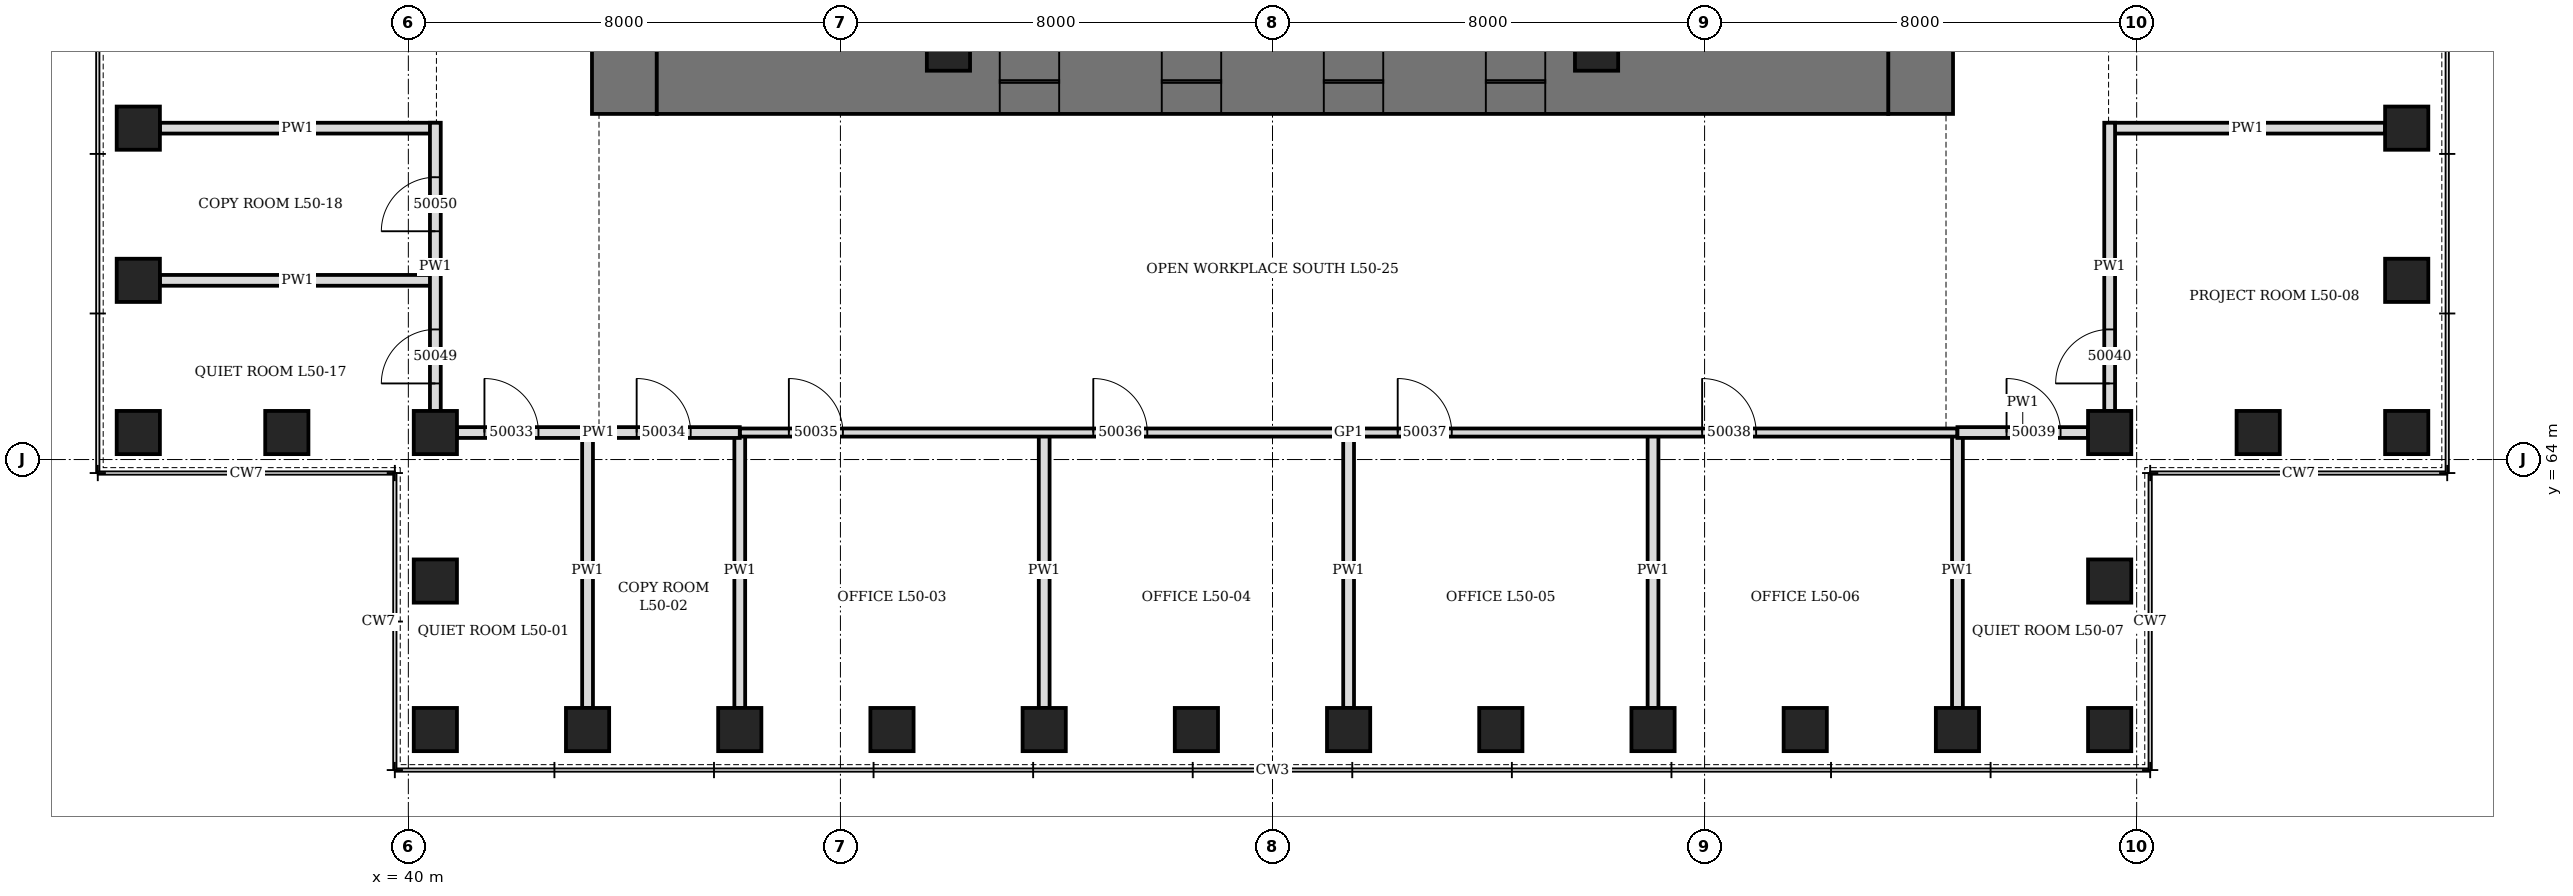
"""IFC4 building model, lengths in metres.
Left out: names, types, materials, properties, quantities, classifications, styles, units other than length and angle.
Written with IfcOpenShell. Run it as: python <this file> out.ifc"""

import sys

from ifc_helpers import new_model, si_unit, direction, frame, frame_2d, origin, origin_2d, place, context, subcontext, project, spatial, rectangle, hollow_rectangle, extrude, element, fill, save


model = new_model("IFC4")
c1 = context("Model", 3, precision=1e-05, world=origin(), true_north=direction((0.0, 1.0)))
c2 = subcontext(c1, "Body", "Model", "MODEL_VIEW")
j1 = project(units=[si_unit("LENGTHUNIT", "METRE"), si_unit("PLANEANGLEUNIT", "RADIAN")], contexts=[c1])
p1 = place(None, origin())
s1 = spatial("IfcSite", under=j1, at=p1, CompositionType="ELEMENT")
p2 = place(p1, origin())
s2 = spatial("IfcBuilding", under=s1, at=p2, CompositionType="ELEMENT")
p3 = place(p2, frame((0.0, 0.0, 223.3)))
s3 = spatial("IfcBuildingStorey", under=s2, at=p3, CompositionType="ELEMENT", Elevation=223.3)
for number, where, z_axis, x_axis in (
    (1, (40.5, 59.0, 0.0), (0.0, 0.0, 1.0), (1.0, 0.0, 0.0)),
    (2, (43.318, 59.0, 0.0), (0.0, 0.0, 1.0), (1.0, 0.0, 0.0)),
    (3, (46.136, 59.0, 0.0), (0.0, 0.0, 1.0), (1.0, 0.0, 0.0)),
    (4, (48.955, 59.0, 0.0), (0.0, 0.0, 1.0), (1.0, 0.0, 0.0)),
    (5, (51.773, 59.0, 0.0), (0.0, 0.0, 1.0), (1.0, 0.0, 0.0)),
    (6, (54.591, 59.0, 0.0), (0.0, 0.0, 1.0), (1.0, 0.0, 0.0)),
    (7, (57.409, 59.0, 0.0), (0.0, 0.0, 1.0), (1.0, 0.0, 0.0)),
    (8, (60.227, 59.0, 0.0), (0.0, 0.0, 1.0), (1.0, 0.0, 0.0)),
    (9, (63.045, 59.0, 0.0), (0.0, 0.0, 1.0), (1.0, 0.0, 0.0)),
    (10, (65.864, 59.0, 0.0), (0.0, 0.0, 1.0), (1.0, 0.0, 0.0)),
    (11, (68.682, 59.0, 0.0), (0.0, 0.0, 1.0), (1.0, 0.0, 0.0)),
    (12, (71.5, 59.0, 0.0), (0.0, 0.0, 1.0), (0.0, 1.0, 0.0)),
    (13, (71.5, 61.75, 0.0), (0.0, 0.0, 1.0), (0.0, 1.0, 0.0)),
    (14, (71.5, 64.5, 0.0), (0.0, 0.0, 1.0), (1.0, 0.0, 0.0)),
    (15, (74.25, 64.5, 0.0), (0.0, 0.0, 1.0), (1.0, 0.0, 0.0)),
    (16, (77.0, 64.5, 0.0), (0.0, 0.0, 1.0), (0.0, 1.0, 0.0)),
    (17, (77.0, 67.318, 0.0), (0.0, 0.0, 1.0), (0.0, 1.0, 0.0)),
    (18, (77.0, 70.136, 0.0), (0.0, 0.0, 1.0), (0.0, 1.0, 0.0)),
    (19, (35.0, 70.136, 0.0), (0.0, 0.0, 1.0), (0.0, 1.0, 0.0)),
    (20, (35.0, 67.318, 0.0), (0.0, 0.0, 1.0), (0.0, 1.0, 0.0)),
    (21, (35.0, 64.5, 0.0), (0.0, 0.0, 1.0), (1.0, 0.0, 0.0)),
    (22, (37.75, 64.5, 0.0), (0.0, 0.0, 1.0), (1.0, 0.0, 0.0)),
    (23, (40.5, 64.5, 0.0), (0.0, 0.0, 1.0), (0.0, 1.0, 0.0)),
    (24, (40.5, 61.75, 0.0), (0.0, 0.0, 1.0), (0.0, 1.0, 0.0)),
):
    element("IfcColumn", number, at=place(p3, frame(where, z_axis=z_axis, x_axis=x_axis)), inside=s3, PredefinedType="COLUMN", context=c2, shape_type="SweptSolid", body=[
        extrude(hollow_rectangle(XDim=0.8, YDim=0.8, WallThickness=0.08, at=origin_2d()), origin(), (0.0, 0.0, 1.0), 4.2),
    ])
p4 = place(p3, frame((44.0, 70.4, 0.0), z_axis=(0.0, 0.0, 1.0), x_axis=(0.0, 1.0, 0.0)))
e25 = element("IfcWall", 25, at=p4, inside=s3, PredefinedType="SHEAR", context=c2, shape_type="SweptSolid", body=[
    extrude(rectangle(XDim=19.2, YDim=1.2, at=frame_2d((9.6, 0.0))), origin(), (0.0, 0.0, 1.0), 4.2),
])
p5 = place(p4, frame((8.6, 0.0, 0.0)))
e26 = element("IfcOpeningElement", 26, at=p5, cuts=e25, PredefinedType="OPENING", context=c2, shape_type="SweptSolid", body=[
    extrude(rectangle(XDim=2.0, YDim=2.4, at=frame_2d((1.0, 1.2))), frame((0.0, 0.61, 0.0), z_axis=(0.0, -1.0, 0.0), x_axis=(1.0, 0.0, 0.0)), (0.0, 0.0, 1.0), 1.22),
])
p6 = place(p3, frame((68.0, 70.4, 0.0), z_axis=(0.0, 0.0, 1.0), x_axis=(0.0, 1.0, 0.0)))
e27 = element("IfcWall", 27, at=p6, inside=s3, PredefinedType="SHEAR", context=c2, shape_type="SweptSolid", body=[
    extrude(rectangle(XDim=19.2, YDim=1.2, at=frame_2d((9.6, 0.0))), origin(), (0.0, 0.0, 1.0), 4.2),
])
p7 = place(p6, frame((8.6, 0.0, 0.0)))
e28 = element("IfcOpeningElement", 28, at=p7, cuts=e27, PredefinedType="OPENING", context=c2, shape_type="SweptSolid", body=[
    extrude(rectangle(XDim=2.0, YDim=2.4, at=frame_2d((1.0, 1.2))), frame((0.0, 0.61, 0.0), z_axis=(0.0, -1.0, 0.0), x_axis=(1.0, 0.0, 0.0)), (0.0, 0.0, 1.0), 1.22),
])
p8 = place(p3, frame((44.6, 71.0, 0.0), z_axis=(0.0, 0.0, 1.0), x_axis=(1.0, 0.0, 0.0)))
e29 = element("IfcWall", 29, at=p8, inside=s3, PredefinedType="SHEAR", context=c2, shape_type="SweptSolid", body=[
    extrude(rectangle(XDim=22.8, YDim=1.2, at=frame_2d((11.4, 0.0))), origin(), (0.0, 0.0, 1.0), 4.2),
])
p9 = place(p8, frame((6.35, 0.0, 0.0)))
e30 = element("IfcOpeningElement", 30, at=p9, cuts=e29, PredefinedType="OPENING", context=c2, shape_type="SweptSolid", body=[
    extrude(rectangle(XDim=1.1, YDim=2.2, at=frame_2d((0.55, 1.1))), frame((0.0, 0.61, 0.0), z_axis=(0.0, -1.0, 0.0), x_axis=(1.0, 0.0, 0.0)), (0.0, 0.0, 1.0), 1.22),
])
p10 = place(p8, frame((9.35, 0.0, 0.0)))
e31 = element("IfcOpeningElement", 31, at=p10, cuts=e29, PredefinedType="OPENING", context=c2, shape_type="SweptSolid", body=[
    extrude(rectangle(XDim=1.1, YDim=2.2, at=frame_2d((0.55, 1.1))), frame((0.0, 0.61, 0.0), z_axis=(0.0, -1.0, 0.0), x_axis=(1.0, 0.0, 0.0)), (0.0, 0.0, 1.0), 1.22),
])
p11 = place(p8, frame((12.35, 0.0, 0.0)))
e32 = element("IfcOpeningElement", 32, at=p11, cuts=e29, PredefinedType="OPENING", context=c2, shape_type="SweptSolid", body=[
    extrude(rectangle(XDim=1.1, YDim=2.2, at=frame_2d((0.55, 1.1))), frame((0.0, 0.61, 0.0), z_axis=(0.0, -1.0, 0.0), x_axis=(1.0, 0.0, 0.0)), (0.0, 0.0, 1.0), 1.22),
])
p12 = place(p8, frame((15.35, 0.0, 0.0)))
e33 = element("IfcOpeningElement", 33, at=p12, cuts=e29, PredefinedType="OPENING", context=c2, shape_type="SweptSolid", body=[
    extrude(rectangle(XDim=1.1, YDim=2.2, at=frame_2d((0.55, 1.1))), frame((0.0, 0.61, 0.0), z_axis=(0.0, -1.0, 0.0), x_axis=(1.0, 0.0, 0.0)), (0.0, 0.0, 1.0), 1.22),
])
for number, where, z_axis, x_axis in (
    (34, (50.0, 71.6, 0.0), (0.0, 0.0, 1.0), (1.0, 0.0, 0.0)),
    (35, (62.0, 71.6, 0.0), (0.0, 0.0, 1.0), (1.0, 0.0, 0.0)),
):
    element("IfcColumn", number, at=place(p3, frame(where, z_axis=z_axis, x_axis=x_axis)), inside=s3, PredefinedType="COLUMN", context=c2, shape_type="SweptSolid", body=[
        extrude(hollow_rectangle(XDim=0.8, YDim=0.8, WallThickness=0.1, at=origin_2d()), origin(), (0.0, 0.0, 1.0), 4.2),
    ])
for number, where, z_axis, x_axis in (
    (36, (43.318, 59.4, 0.0), (0.0, 0.0, 1.0), (0.0, 1.0, 0.0)),
    (37, (46.136, 59.4, 0.0), (0.0, 0.0, 1.0), (0.0, 1.0, 0.0)),
    (38, (51.773, 59.4, 0.0), (0.0, 0.0, 1.0), (0.0, 1.0, 0.0)),
    (39, (57.409, 59.4, 0.0), (0.0, 0.0, 1.0), (0.0, 1.0, 0.0)),
    (40, (63.045, 59.4, 0.0), (0.0, 0.0, 1.0), (0.0, 1.0, 0.0)),
    (41, (68.682, 59.4, 0.0), (0.0, 0.0, 1.0), (0.0, 1.0, 0.0)),
    (42, (71.5, 70.136, 0.0), (0.0, 0.0, 1.0), (1.0, 0.0, 0.0)),
    (43, (35.4, 67.318, 0.0), (0.0, 0.0, 1.0), (1.0, 0.0, 0.0)),
    (44, (35.4, 70.136, 0.0), (0.0, 0.0, 1.0), (1.0, 0.0, 0.0)),
):
    element("IfcWall", number, at=place(p3, frame(where, z_axis=z_axis, x_axis=x_axis)), inside=s3, PredefinedType="PARTITIONING", context=c2, shape_type="SweptSolid", body=[
        extrude(rectangle(XDim=5.1, YDim=0.2, at=frame_2d((2.55, 0.0))), origin(), (0.0, 0.0, 1.0), 3.428),
    ])
p13 = place(p3, frame((46.136, 64.5, 0.0), z_axis=(0.0, 0.0, 1.0), x_axis=(1.0, 0.0, 0.0)))
e45 = element("IfcWall", 45, at=p13, inside=s3, PredefinedType="PARTITIONING", context=c2, shape_type="SweptSolid", body=[
    extrude(rectangle(XDim=22.545, YDim=0.15, at=frame_2d((11.273, 0.0))), origin(), (0.0, 0.0, 1.0), 4.04),
])
p14 = place(p13, frame((0.909, 0.0, 0.0)))
e46 = element("IfcOpeningElement", 46, at=p14, cuts=e45, PredefinedType="OPENING", context=c2, shape_type="SweptSolid", body=[
    extrude(rectangle(XDim=1.0, YDim=2.1, at=frame_2d((0.5, 1.05))), frame((0.0, 0.085, 0.0), z_axis=(0.0, -1.0, 0.0), x_axis=(1.0, 0.0, 0.0)), (0.0, 0.0, 1.0), 0.17),
])
p15 = place(p13, frame((6.545, 0.0, 0.0)))
e47 = element("IfcOpeningElement", 47, at=p15, cuts=e45, PredefinedType="OPENING", context=c2, shape_type="SweptSolid", body=[
    extrude(rectangle(XDim=1.0, YDim=2.1, at=frame_2d((0.5, 1.05))), frame((0.0, 0.085, 0.0), z_axis=(0.0, -1.0, 0.0), x_axis=(1.0, 0.0, 0.0)), (0.0, 0.0, 1.0), 0.17),
])
p16 = place(p13, frame((12.182, 0.0, 0.0)))
e48 = element("IfcOpeningElement", 48, at=p16, cuts=e45, PredefinedType="OPENING", context=c2, shape_type="SweptSolid", body=[
    extrude(rectangle(XDim=1.0, YDim=2.1, at=frame_2d((0.5, 1.05))), frame((0.0, 0.085, 0.0), z_axis=(0.0, -1.0, 0.0), x_axis=(1.0, 0.0, 0.0)), (0.0, 0.0, 1.0), 0.17),
])
p17 = place(p13, frame((17.818, 0.0, 0.0)))
e49 = element("IfcOpeningElement", 49, at=p17, cuts=e45, PredefinedType="OPENING", context=c2, shape_type="SweptSolid", body=[
    extrude(rectangle(XDim=1.0, YDim=2.1, at=frame_2d((0.5, 1.05))), frame((0.0, 0.085, 0.0), z_axis=(0.0, -1.0, 0.0), x_axis=(1.0, 0.0, 0.0)), (0.0, 0.0, 1.0), 0.17),
])
p18 = place(p3, frame((40.9, 64.5, 0.0), z_axis=(0.0, 0.0, 1.0), x_axis=(1.0, 0.0, 0.0)))
e50 = element("IfcWall", 50, at=p18, inside=s3, PredefinedType="PARTITIONING", context=c2, shape_type="SweptSolid", body=[
    extrude(rectangle(XDim=5.237, YDim=0.2, at=frame_2d((2.618, 0.0))), origin(), (0.0, 0.0, 1.0), 4.04),
])
p19 = place(p18, frame((0.509, 0.0, 0.0)))
e51 = element("IfcOpeningElement", 51, at=p19, cuts=e50, PredefinedType="OPENING", context=c2, shape_type="SweptSolid", body=[
    extrude(rectangle(XDim=1.0, YDim=2.1, at=frame_2d((0.5, 1.05))), frame((0.0, 0.11, 0.0), z_axis=(0.0, -1.0, 0.0), x_axis=(1.0, 0.0, 0.0)), (0.0, 0.0, 1.0), 0.22),
])
p20 = place(p18, frame((3.327, 0.0, 0.0)))
e52 = element("IfcOpeningElement", 52, at=p20, cuts=e50, PredefinedType="OPENING", context=c2, shape_type="SweptSolid", body=[
    extrude(rectangle(XDim=1.0, YDim=2.1, at=frame_2d((0.5, 1.05))), frame((0.0, 0.11, 0.0), z_axis=(0.0, -1.0, 0.0), x_axis=(1.0, 0.0, 0.0)), (0.0, 0.0, 1.0), 0.22),
])
p21 = place(p3, frame((68.682, 64.5, 0.0), z_axis=(0.0, 0.0, 1.0), x_axis=(1.0, 0.0, 0.0)))
e53 = element("IfcWall", 53, at=p21, inside=s3, PredefinedType="PARTITIONING", context=c2, shape_type="SweptSolid", body=[
    extrude(rectangle(XDim=2.418, YDim=0.2, at=frame_2d((1.209, 0.0))), origin(), (0.0, 0.0, 1.0), 4.04),
])
p22 = place(p21, frame((0.909, 0.0, 0.0)))
e54 = element("IfcOpeningElement", 54, at=p22, cuts=e53, PredefinedType="OPENING", context=c2, shape_type="SweptSolid", body=[
    extrude(rectangle(XDim=1.0, YDim=2.1, at=frame_2d((0.5, 1.05))), frame((0.0, 0.11, 0.0), z_axis=(0.0, -1.0, 0.0), x_axis=(1.0, 0.0, 0.0)), (0.0, 0.0, 1.0), 0.22),
])
p23 = place(p3, frame((40.5, 64.9, 0.0), z_axis=(0.0, 0.0, 1.0), x_axis=(0.0, 1.0, 0.0)))
e55 = element("IfcWall", 55, at=p23, inside=s3, PredefinedType="PARTITIONING", context=c2, shape_type="SweptSolid", body=[
    extrude(rectangle(XDim=5.336, YDim=0.2, at=frame_2d((2.668, 0.0))), origin(), (0.0, 0.0, 1.0), 4.04),
])
p24 = place(p23, frame((0.509, 0.0, 0.0)))
e56 = element("IfcOpeningElement", 56, at=p24, cuts=e55, PredefinedType="OPENING", context=c2, shape_type="SweptSolid", body=[
    extrude(rectangle(XDim=1.0, YDim=2.1, at=frame_2d((0.5, 1.05))), frame((0.0, 0.11, 0.0), z_axis=(0.0, -1.0, 0.0), x_axis=(1.0, 0.0, 0.0)), (0.0, 0.0, 1.0), 0.22),
])
p25 = place(p23, frame((3.327, 0.0, 0.0)))
e57 = element("IfcOpeningElement", 57, at=p25, cuts=e55, PredefinedType="OPENING", context=c2, shape_type="SweptSolid", body=[
    extrude(rectangle(XDim=1.0, YDim=2.1, at=frame_2d((0.5, 1.05))), frame((0.0, 0.11, 0.0), z_axis=(0.0, -1.0, 0.0), x_axis=(1.0, 0.0, 0.0)), (0.0, 0.0, 1.0), 0.22),
])
p26 = place(p3, frame((71.5, 64.9, 0.0), z_axis=(0.0, 0.0, 1.0), x_axis=(0.0, 1.0, 0.0)))
e58 = element("IfcWall", 58, at=p26, inside=s3, PredefinedType="PARTITIONING", context=c2, shape_type="SweptSolid", body=[
    extrude(rectangle(XDim=5.336, YDim=0.2, at=frame_2d((2.668, 0.0))), origin(), (0.0, 0.0, 1.0), 4.04),
])
p27 = place(p26, frame((0.509, 0.0, 0.0)))
e59 = element("IfcOpeningElement", 59, at=p27, cuts=e58, PredefinedType="OPENING", context=c2, shape_type="SweptSolid", body=[
    extrude(rectangle(XDim=1.0, YDim=2.1, at=frame_2d((0.5, 1.05))), frame((0.0, 0.11, 0.0), z_axis=(0.0, -1.0, 0.0), x_axis=(1.0, 0.0, 0.0)), (0.0, 0.0, 1.0), 0.22),
])
p28 = place(p9, origin())
e60 = element("IfcDoor", 60, at=p28, inside=s3, OperationType="SLIDING_TO_LEFT", PredefinedType="DOOR", context=c2, shape_type="SweptSolid", body=[
    extrude(rectangle(XDim=1.1, YDim=2.2, at=frame_2d((0.55, 1.1))), frame((0.0, 0.35, 0.0), z_axis=(0.0, -1.0, 0.0), x_axis=(1.0, 0.0, 0.0)), (0.0, 0.0, 1.0), 0.7),
])
fill(e30, e60)
p29 = place(p10, origin())
e61 = element("IfcDoor", 61, at=p29, inside=s3, OperationType="SLIDING_TO_LEFT", PredefinedType="DOOR", context=c2, shape_type="SweptSolid", body=[
    extrude(rectangle(XDim=1.1, YDim=2.2, at=frame_2d((0.55, 1.1))), frame((0.0, 0.35, 0.0), z_axis=(0.0, -1.0, 0.0), x_axis=(1.0, 0.0, 0.0)), (0.0, 0.0, 1.0), 0.7),
])
fill(e31, e61)
p30 = place(p11, origin())
e62 = element("IfcDoor", 62, at=p30, inside=s3, OperationType="SLIDING_TO_LEFT", PredefinedType="DOOR", context=c2, shape_type="SweptSolid", body=[
    extrude(rectangle(XDim=1.1, YDim=2.2, at=frame_2d((0.55, 1.1))), frame((0.0, 0.35, 0.0), z_axis=(0.0, -1.0, 0.0), x_axis=(1.0, 0.0, 0.0)), (0.0, 0.0, 1.0), 0.7),
])
fill(e32, e62)
p31 = place(p12, origin())
e63 = element("IfcDoor", 63, at=p31, inside=s3, OperationType="SLIDING_TO_LEFT", PredefinedType="DOOR", context=c2, shape_type="SweptSolid", body=[
    extrude(rectangle(XDim=1.1, YDim=2.2, at=frame_2d((0.55, 1.1))), frame((0.0, 0.35, 0.0), z_axis=(0.0, -1.0, 0.0), x_axis=(1.0, 0.0, 0.0)), (0.0, 0.0, 1.0), 0.7),
])
fill(e33, e63)
p32 = place(p19, origin())
e64 = element("IfcDoor", 64, at=p32, inside=s3, OperationType="SINGLE_SWING_LEFT", PredefinedType="DOOR", context=c2, shape_type="SweptSolid", body=[
    extrude(rectangle(XDim=1.0, YDim=2.1, at=frame_2d((0.5, 1.05))), frame((0.0, 0.1, 0.0), z_axis=(0.0, -1.0, 0.0), x_axis=(1.0, 0.0, 0.0)), (0.0, 0.0, 1.0), 0.199),
])
fill(e51, e64)
p33 = place(p20, origin())
e65 = element("IfcDoor", 65, at=p33, inside=s3, OperationType="SINGLE_SWING_LEFT", PredefinedType="DOOR", context=c2, shape_type="SweptSolid", body=[
    extrude(rectangle(XDim=1.0, YDim=2.1, at=frame_2d((0.5, 1.05))), frame((0.0, 0.1, 0.0), z_axis=(0.0, -1.0, 0.0), x_axis=(1.0, 0.0, 0.0)), (0.0, 0.0, 1.0), 0.199),
])
fill(e52, e65)
p34 = place(p14, origin())
e66 = element("IfcDoor", 66, at=p34, inside=s3, OperationType="SINGLE_SWING_LEFT", PredefinedType="DOOR", context=c2, shape_type="SweptSolid", body=[
    extrude(rectangle(XDim=1.0, YDim=2.1, at=frame_2d((0.5, 1.05))), frame((0.0, 0.075, 0.0), z_axis=(0.0, -1.0, 0.0), x_axis=(1.0, 0.0, 0.0)), (0.0, 0.0, 1.0), 0.149),
])
fill(e46, e66)
p35 = place(p15, origin())
e67 = element("IfcDoor", 67, at=p35, inside=s3, OperationType="SINGLE_SWING_LEFT", PredefinedType="DOOR", context=c2, shape_type="SweptSolid", body=[
    extrude(rectangle(XDim=1.0, YDim=2.1, at=frame_2d((0.5, 1.05))), frame((0.0, 0.075, 0.0), z_axis=(0.0, -1.0, 0.0), x_axis=(1.0, 0.0, 0.0)), (0.0, 0.0, 1.0), 0.149),
])
fill(e47, e67)
p36 = place(p16, origin())
e68 = element("IfcDoor", 68, at=p36, inside=s3, OperationType="SINGLE_SWING_LEFT", PredefinedType="DOOR", context=c2, shape_type="SweptSolid", body=[
    extrude(rectangle(XDim=1.0, YDim=2.1, at=frame_2d((0.5, 1.05))), frame((0.0, 0.075, 0.0), z_axis=(0.0, -1.0, 0.0), x_axis=(1.0, 0.0, 0.0)), (0.0, 0.0, 1.0), 0.149),
])
fill(e48, e68)
p37 = place(p17, origin())
e69 = element("IfcDoor", 69, at=p37, inside=s3, OperationType="SINGLE_SWING_LEFT", PredefinedType="DOOR", context=c2, shape_type="SweptSolid", body=[
    extrude(rectangle(XDim=1.0, YDim=2.1, at=frame_2d((0.5, 1.05))), frame((0.0, 0.075, 0.0), z_axis=(0.0, -1.0, 0.0), x_axis=(1.0, 0.0, 0.0)), (0.0, 0.0, 1.0), 0.149),
])
fill(e49, e69)
p38 = place(p22, origin())
e70 = element("IfcDoor", 70, at=p38, inside=s3, OperationType="SINGLE_SWING_LEFT", PredefinedType="DOOR", context=c2, shape_type="SweptSolid", body=[
    extrude(rectangle(XDim=1.0, YDim=2.1, at=frame_2d((0.5, 1.05))), frame((0.0, 0.1, 0.0), z_axis=(0.0, -1.0, 0.0), x_axis=(1.0, 0.0, 0.0)), (0.0, 0.0, 1.0), 0.199),
])
fill(e54, e70)
p39 = place(p27, origin())
e71 = element("IfcDoor", 71, at=p39, inside=s3, OperationType="SINGLE_SWING_LEFT", PredefinedType="DOOR", context=c2, shape_type="SweptSolid", body=[
    extrude(rectangle(XDim=1.0, YDim=2.1, at=frame_2d((0.5, 1.05))), frame((0.0, 0.1, 0.0), z_axis=(0.0, -1.0, 0.0), x_axis=(1.0, 0.0, 0.0)), (0.0, 0.0, 1.0), 0.199),
])
fill(e59, e71)
p40 = place(p24, origin())
e72 = element("IfcDoor", 72, at=p40, inside=s3, OperationType="SINGLE_SWING_LEFT", PredefinedType="DOOR", context=c2, shape_type="SweptSolid", body=[
    extrude(rectangle(XDim=1.0, YDim=2.1, at=frame_2d((0.5, 1.05))), frame((0.0, 0.1, 0.0), z_axis=(0.0, -1.0, 0.0), x_axis=(1.0, 0.0, 0.0)), (0.0, 0.0, 1.0), 0.199),
])
fill(e56, e72)
p41 = place(p25, origin())
e73 = element("IfcDoor", 73, at=p41, inside=s3, OperationType="SINGLE_SWING_LEFT", PredefinedType="DOOR", context=c2, shape_type="SweptSolid", body=[
    extrude(rectangle(XDim=1.0, YDim=2.1, at=frame_2d((0.5, 1.05))), frame((0.0, 0.1, 0.0), z_axis=(0.0, -1.0, 0.0), x_axis=(1.0, 0.0, 0.0)), (0.0, 0.0, 1.0), 0.199),
])
fill(e57, e73)
save(model, sys.argv[1])
